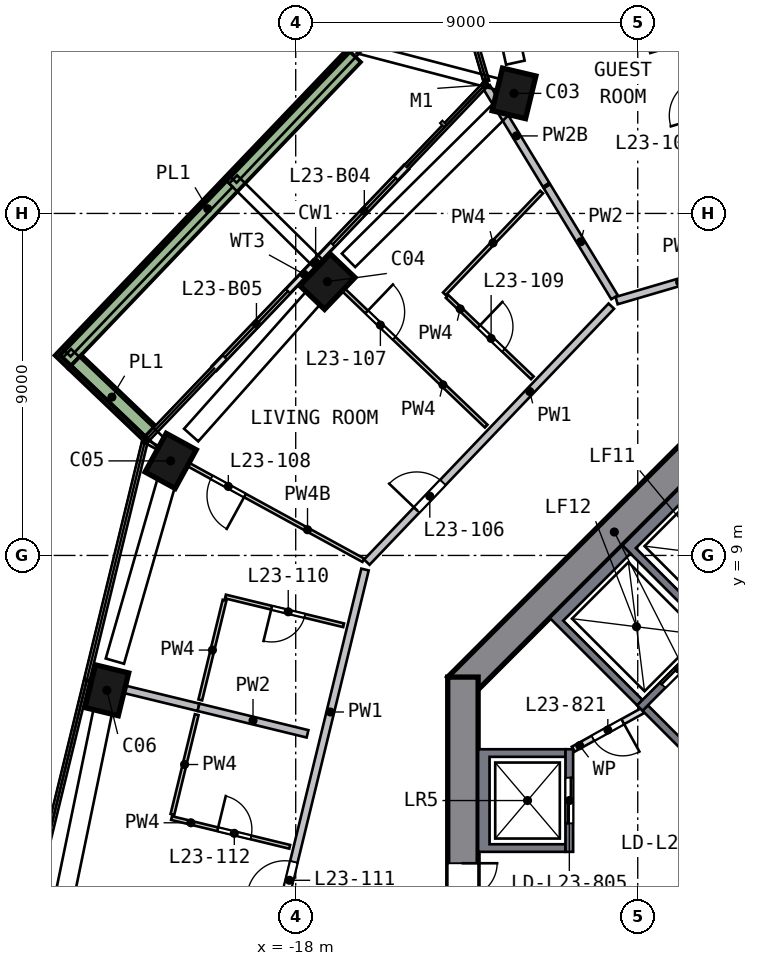
"""IFC4 building model, lengths in metres.
Left out: names, types, materials, properties, quantities, classifications, styles, units other than length and angle.
Written with IfcOpenShell. Run it as: python <this file> out.ifc"""

import sys

from ifc_helpers import new_model, si_unit, direction, frame, frame_2d, origin, origin_2d, place, context, subcontext, project, spatial, polyline, rectangle, outline, extrude, element, fill, save


model = new_model("IFC4")
c1 = context("Model", 3, precision=1e-05, world=origin(), true_north=direction((0.0, 1.0)))
c2 = subcontext(c1, "Body", "Model", "MODEL_VIEW")
j1 = project(units=[si_unit("LENGTHUNIT", "METRE"), si_unit("PLANEANGLEUNIT", "RADIAN")], contexts=[c1])
p1 = place(None, origin())
s1 = spatial("IfcSite", under=j1, at=p1, CompositionType="ELEMENT")
p2 = place(p1, origin())
s2 = spatial("IfcBuilding", under=s1, at=p2, CompositionType="ELEMENT")
p3 = place(p2, frame((0.0, 0.0, 100.0)))
s3 = spatial("IfcBuildingStorey", under=s2, at=p3, CompositionType="ELEMENT", Elevation=100.0)
p4 = place(p3, frame((-12.135, 21.23, 0.0), z_axis=(-0.100492101, -0.058531708, 0.993214668), x_axis=(0.229352652, 0.970019569, 0.080370372)))
e1 = element("IfcColumn", 1, at=p4, inside=s3, PredefinedType="COLUMN", context=c2, shape_type="SweptSolid", body=[
    extrude(rectangle(XDim=1.15, YDim=0.9, at=origin_2d()), origin(), (0.0, 0.0, 1.0), 3.212),
])
p5 = place(p3, frame((-17.074, 16.305, 0.0), z_axis=(-0.076886597, -0.0819059, 0.993669902), x_axis=(-0.686204712, -0.718682033, -0.112335337)))
e2 = element("IfcColumn", 2, at=p5, inside=s3, PredefinedType="COLUMN", context=c2, shape_type="SweptSolid", body=[
    extrude(rectangle(XDim=1.15, YDim=0.9, at=origin_2d()), origin(), (0.0, 0.0, 1.0), 3.21),
])
p6 = place(p3, frame((-21.225, 11.611, 0.0), z_axis=(-0.054358694, -0.101418877, 0.993357611), x_axis=(0.47668315, 0.871512169, 0.115063959)))
e3 = element("IfcColumn", 3, at=p6, inside=s3, PredefinedType="COLUMN", context=c2, shape_type="SweptSolid", body=[
    extrude(rectangle(XDim=1.15, YDim=0.9, at=origin_2d()), origin(), (0.0, 0.0, 1.0), 3.211),
])
p7 = place(p3, frame((-22.939, 5.583, 0.0), z_axis=(-0.025629126, -0.109285026, 0.993679994), x_axis=(-0.235079586, -0.965473156, -0.112246039)))
e4 = element("IfcColumn", 4, at=p7, inside=s3, PredefinedType="COLUMN", context=c2, shape_type="SweptSolid", body=[
    extrude(rectangle(XDim=1.15, YDim=0.9, at=origin_2d()), origin(), (0.0, 0.0, 1.0), 3.21),
])
p8 = place(p3, frame((-8.208, 22.873, 0.0), z_axis=(-0.108407543, -0.039911613, 0.993305022), x_axis=(-0.281714768, 0.959466442, 0.007806109)))
e5 = element("IfcColumn", 5, at=p8, inside=s3, PredefinedType="COLUMN", context=c2, shape_type="SweptSolid", body=[
    extrude(rectangle(XDim=0.9, YDim=0.9, at=origin_2d()), origin(), (0.0, 0.0, 1.0), 3.211),
])
p9 = place(p3, frame((-5.516, 13.717, 0.0), z_axis=(0.0, 0.0, 1.0), x_axis=(-0.707106781, -0.707106781, 0.0)))
e6 = element("IfcWall", 6, at=p9, inside=s3, PredefinedType="SHEAR", context=c2, shape_type="SweptSolid", body=[
    extrude(rectangle(XDim=11.598, YDim=0.8, at=frame_2d((5.799, 0.0))), origin(), (0.0, 0.0, 1.0), 3.5),
])
p10 = place(p3, frame((-13.6, 5.799, 0.0), z_axis=(0.0, 0.0, 1.0), x_axis=(0.0, -1.0, 0.0)))
e7 = element("IfcWall", 7, at=p10, inside=s3, PredefinedType="SHEAR", context=c2, shape_type="SweptSolid", body=[
    extrude(rectangle(XDim=11.598, YDim=0.8, at=frame_2d((5.799, 0.0))), origin(), (0.0, 0.0, 1.0), 3.5),
])
p11 = place(p10, frame((4.899, 0.0, 0.0)))
e8 = element("IfcOpeningElement", 8, at=p11, cuts=e7, PredefinedType="OPENING", context=c2, shape_type="SweptSolid", body=[
    extrude(rectangle(XDim=1.8, YDim=2.1, at=frame_2d((0.9, 1.05))), frame((0.0, 0.41, 0.0), z_axis=(0.0, -1.0, 0.0), x_axis=(1.0, 0.0, 0.0)), (0.0, 0.0, 1.0), 0.82),
])
p12 = place(p3, frame((-15.09, 19.215, 0.0), z_axis=(0.0, 0.0, 1.0), x_axis=(-0.690619436, -0.723218359, 0.0)))
e9 = element("IfcWall", 9, at=p12, inside=s3, PredefinedType="SOLIDWALL", context=c2, shape_type="SweptSolid", body=[
    extrude(rectangle(XDim=3.475, YDim=0.15, at=frame_2d((1.738, 0.0))), origin(), (0.0, 0.0, 1.0), 2.425),
])
p13 = place(p12, frame((0.4, 0.0, 0.0)))
e10 = element("IfcOpeningElement", 10, at=p13, cuts=e9, PredefinedType="OPENING", context=c2, shape_type="SweptSolid", body=[
    extrude(rectangle(XDim=2.4, YDim=2.4, at=frame_2d((1.2, 1.2))), frame((0.0, 0.085, 0.0), z_axis=(0.0, -1.0, 0.0), x_axis=(1.0, 0.0, 0.0)), (0.0, 0.0, 1.0), 0.17),
])
p14 = place(p3, frame((-17.49, 16.702, 0.0), z_axis=(0.0, 0.0, 1.0), x_axis=(-0.690655886, -0.72318355, 0.0)))
e11 = element("IfcWall", 11, at=p14, inside=s3, PredefinedType="SOLIDWALL", context=c2, shape_type="SweptSolid", body=[
    extrude(rectangle(XDim=3.835, YDim=0.15, at=frame_2d((1.918, 0.0))), origin(), (0.0, 0.0, 1.0), 2.425),
])
p15 = place(p14, frame((1.035, 0.0, 0.0)))
e12 = element("IfcOpeningElement", 12, at=p15, cuts=e11, PredefinedType="OPENING", context=c2, shape_type="SweptSolid", body=[
    extrude(rectangle(XDim=2.4, YDim=2.4, at=frame_2d((1.2, 1.2))), frame((0.0, 0.085, 0.0), z_axis=(0.0, -1.0, 0.0), x_axis=(1.0, 0.0, 0.0)), (0.0, 0.0, 1.0), 0.17),
])
p16 = place(p3, frame((-16.464, 22.156, 0.0), z_axis=(0.0, 0.0, 1.0), x_axis=(-0.690643379, -0.723195495, 0.0)))
e13 = element("IfcWall", 13, at=p16, inside=s3, PredefinedType="SOLIDWALL", context=c2, shape_type="SweptSolid", body=[
    extrude(rectangle(XDim=11.153, YDim=0.5, at=frame_2d((5.576, 0.0))), origin(), (0.0, 0.0, 1.0), 0.7),
])
p17 = place(p3, frame((-23.813, 14.098, 0.0), z_axis=(0.0, 0.0, 1.0), x_axis=(0.723201505, -0.690637085, 0.0)))
e14 = element("IfcWall", 14, at=p17, inside=s3, PredefinedType="SOLIDWALL", context=c2, shape_type="SweptSolid", body=[
    extrude(rectangle(XDim=2.699, YDim=0.5, at=frame_2d((1.35, 0.0))), origin(), (0.0, 0.0, 1.0), 0.7),
])
p18 = place(p3, origin())
e15 = element("IfcWall", 15, at=p18, inside=s3, PredefinedType="SOLIDWALL", context=c2, shape_type="SweptSolid", body=[
    extrude(outline(polyline([(-13.2, 3.9), (-10.9, 3.9), (-10.9, 3.7), (-12.9, 3.7), (-12.9, 1.4), (-10.9, 1.4), (-10.9, 1.2), (-13.2, 1.2), (-13.2, 3.9)])), origin(), (0.0, 0.0, 1.0), 3.19),
])
p19 = place(p3, frame((-10.8, 1.2, 0.0), z_axis=(0.0, 0.0, 1.0), x_axis=(0.0, 1.0, 0.0)))
e16 = element("IfcWall", 16, at=p19, inside=s3, PredefinedType="SOLIDWALL", context=c2, shape_type="SweptSolid", body=[
    extrude(rectangle(XDim=2.7, YDim=0.2, at=frame_2d((1.35, 0.0))), origin(), (0.0, 0.0, 1.0), 3.19),
])
p20 = place(p19, frame((0.75, 0.0, 0.0)))
e17 = element("IfcOpeningElement", 17, at=p20, cuts=e16, PredefinedType="OPENING", context=c2, shape_type="SweptSolid", body=[
    extrude(rectangle(XDim=1.2, YDim=2.1, at=frame_2d((0.6, 1.05))), frame((0.0, 0.11, 0.0), z_axis=(0.0, -1.0, 0.0), x_axis=(1.0, 0.0, 0.0)), (0.0, 0.0, 1.0), 0.22),
])
p21 = place(p3, origin())
e18 = element("IfcWall", 18, at=p21, inside=s3, PredefinedType="SOLIDWALL", context=c2, shape_type="SweptSolid", body=[
    extrude(outline(polyline([(-9.405, 9.263), (-7.354, 11.314), (-5.056, 9.016), (-5.197, 8.874), (-7.283, 10.96), (-9.051, 9.192), (-6.965, 7.106), (-7.106, 6.965), (-9.405, 9.263)])), origin(), (0.0, 0.0, 1.0), 3.19),
])
p22 = place(p3, origin())
e19 = element("IfcWall", 19, at=p22, inside=s3, PredefinedType="SOLIDWALL", context=c2, shape_type="SweptSolid", body=[
    extrude(outline(polyline([(-11.314, 7.354), (-9.405, 9.263), (-9.192, 9.051), (-10.96, 7.283), (-8.874, 5.197), (-9.016, 5.056), (-11.314, 7.354)])), origin(), (0.0, 0.0, 1.0), 3.19),
])
p23 = place(p3, frame((-7.036, 6.894, 0.0), z_axis=(0.0, 0.0, 1.0), x_axis=(-0.707106781, -0.707106781, 0.0)))
e20 = element("IfcWall", 20, at=p23, inside=s3, PredefinedType="SOLIDWALL", context=c2, shape_type="SweptSolid", body=[
    extrude(rectangle(XDim=2.7, YDim=0.2, at=frame_2d((1.35, 0.0))), origin(), (0.0, 0.0, 1.0), 3.19),
])
p24 = place(p23, frame((0.65, 0.0, 0.0)))
e21 = element("IfcOpeningElement", 21, at=p24, cuts=e20, PredefinedType="OPENING", context=c2, shape_type="SweptSolid", body=[
    extrude(rectangle(XDim=1.2, YDim=2.1, at=frame_2d((0.6, 1.05))), frame((0.0, 0.11, 0.0), z_axis=(0.0, -1.0, 0.0), x_axis=(1.0, 0.0, 0.0)), (0.0, 0.0, 1.0), 0.22),
])
p25 = place(p3, frame((-6.823, 3.005, 0.0), z_axis=(0.0, 0.0, 1.0), x_axis=(-0.707106781, 0.707106781, 0.0)))
e22 = element("IfcWall", 22, at=p25, inside=s3, PredefinedType="SOLIDWALL", context=c2, shape_type="SweptSolid", body=[
    extrude(rectangle(XDim=2.8, YDim=0.2, at=frame_2d((1.4, 0.0))), origin(), (0.0, 0.0, 1.0), 3.19),
])
p26 = place(p3, frame((-8.874, 4.914, 0.0), z_axis=(0.0, 0.0, 1.0), x_axis=(-0.874129705, -0.485692555, 0.0)))
e23 = element("IfcWall", 23, at=p26, inside=s3, PredefinedType="PARTITIONING", context=c2, shape_type="SweptSolid", body=[
    extrude(rectangle(XDim=2.089, YDim=0.15, at=frame_2d((1.044, 0.0))), origin(), (0.0, 0.0, 1.0), 3.19),
])
p27 = place(p26, frame((0.594, 0.0, 0.0)))
e24 = element("IfcOpeningElement", 24, at=p27, cuts=e23, PredefinedType="OPENING", context=c2, shape_type="SweptSolid", body=[
    extrude(rectangle(XDim=0.9, YDim=2.1, at=frame_2d((0.45, 1.05))), frame((0.0, 0.085, 0.0), z_axis=(0.0, -1.0, 0.0), x_axis=(1.0, 0.0, 0.0)), (0.0, 0.0, 1.0), 0.17),
])
p28 = place(p3, frame((-18.333, -0.229, 0.0), z_axis=(0.0, 0.0, 1.0), x_axis=(0.236500551, 0.971631355, 0.0)))
e25 = element("IfcWall", 25, at=p28, inside=s3, PredefinedType="SOLIDWALL", context=c2, shape_type="SweptSolid", body=[
    extrude(rectangle(XDim=9.116, YDim=0.2, at=frame_2d((4.558, 0.0))), origin(), (0.0, 0.0, 1.0), 3.19),
])
p29 = place(p28, frame((0.2, 0.0, 0.0)))
e26 = element("IfcOpeningElement", 26, at=p29, cuts=e25, PredefinedType="OPENING", context=c2, shape_type="SweptSolid", body=[
    extrude(rectangle(XDim=1.0, YDim=2.1, at=frame_2d((0.5, 1.05))), frame((0.0, 0.11, 0.0), z_axis=(0.0, -1.0, 0.0), x_axis=(1.0, 0.0, 0.0)), (0.0, 0.0, 1.0), 0.22),
])
p30 = place(p3, frame((-16.129, 8.823, 0.0), z_axis=(0.0, 0.0, 1.0), x_axis=(0.69063279, 0.723205606, 0.0)))
e27 = element("IfcWall", 27, at=p30, inside=s3, PredefinedType="SOLIDWALL", context=c2, shape_type="SweptSolid", body=[
    extrude(rectangle(XDim=9.317, YDim=0.2, at=frame_2d((4.658, 0.0))), origin(), (0.0, 0.0, 1.0), 3.19),
])
p31 = place(p30, frame((1.9, 0.0, 0.0)))
e28 = element("IfcOpeningElement", 28, at=p31, cuts=e27, PredefinedType="OPENING", context=c2, shape_type="SweptSolid", body=[
    extrude(rectangle(XDim=1.0, YDim=2.1, at=frame_2d((0.5, 1.05))), frame((0.0, 0.11, 0.0), z_axis=(0.0, -1.0, 0.0), x_axis=(1.0, 0.0, 0.0)), (0.0, 0.0, 1.0), 0.22),
])
p32 = place(p3, frame((-6.238, 16.677, 0.0), z_axis=(0.0, 0.0, 1.0), x_axis=(-0.959713265, -0.280981227, 0.0)))
e29 = element("IfcWall", 29, at=p32, inside=s3, PredefinedType="SOLIDWALL", context=c2, shape_type="SweptSolid", body=[
    extrude(rectangle(XDim=3.458, YDim=0.2, at=frame_2d((1.729, 0.0))), origin(), (0.0, 0.0, 1.0), 3.19),
])
p33 = place(p3, frame((-6.046, 16.734, 0.0), z_axis=(0.0, 0.0, 1.0), x_axis=(-0.280980732, 0.959713409, 0.0)))
e30 = element("IfcWall", 30, at=p33, inside=s3, PredefinedType="SOLIDWALL", context=c2, shape_type="SweptSolid", body=[
    extrude(rectangle(XDim=11.708, YDim=0.2, at=frame_2d((5.854, 0.0))), origin(), (0.0, 0.0, 1.0), 3.19),
])
p34 = place(p33, frame((4.0, 0.0, 0.0)))
e31 = element("IfcOpeningElement", 31, at=p34, cuts=e30, PredefinedType="OPENING", context=c2, shape_type="SweptSolid", body=[
    extrude(rectangle(XDim=1.0, YDim=2.1, at=frame_2d((0.5, 1.05))), frame((0.0, 0.11, 0.0), z_axis=(0.0, -1.0, 0.0), x_axis=(1.0, 0.0, 0.0)), (0.0, 0.0, 1.0), 0.22),
])
p35 = place(p3, frame((-20.558, 5.004, 0.0), z_axis=(0.0, 0.0, 1.0), x_axis=(-0.971623409, 0.236533194, 0.0)))
e32 = element("IfcWall", 32, at=p35, inside=s3, PredefinedType="SOLIDWALL", context=c2, shape_type="SweptSolid", body=[
    extrude(rectangle(XDim=2.95, YDim=0.2, at=frame_2d((1.475, 0.0))), origin(), (0.0, 0.0, 1.0), 3.19),
])
p36 = place(p3, frame((-17.689, 4.306, 0.0), z_axis=(0.0, 0.0, 1.0), x_axis=(-0.971636288, 0.236480281, 0.0)))
e33 = element("IfcWall", 33, at=p36, inside=s3, PredefinedType="SOLIDWALL", context=c2, shape_type="SweptSolid", body=[
    extrude(rectangle(XDim=2.953, YDim=0.2, at=frame_2d((1.476, 0.0))), origin(), (0.0, 0.0, 1.0), 3.19),
])
p37 = place(p3, frame((-11.411, 18.754, 0.0), z_axis=(0.0, 0.0, 1.0), x_axis=(-0.51983892, 0.854264302, 0.0)))
e34 = element("IfcWall", 34, at=p37, inside=s3, PredefinedType="SOLIDWALL", context=c2, shape_type="SweptSolid", body=[
    extrude(rectangle(XDim=3.011, YDim=0.2, at=frame_2d((1.506, 0.0))), origin(), (0.0, 0.0, 1.0), 2.69),
])
p38 = place(p3, frame((-9.611, 15.794, 0.0), z_axis=(0.0, 0.0, 1.0), x_axis=(-0.519810992, 0.854281296, 0.0)))
e35 = element("IfcWall", 35, at=p38, inside=s3, PredefinedType="SOLIDWALL", context=c2, shape_type="SweptSolid", body=[
    extrude(rectangle(XDim=3.418, YDim=0.2, at=frame_2d((1.709, 0.0))), origin(), (0.0, 0.0, 1.0), 3.19),
])
p39 = place(p3, frame((-21.244, 2.186, 0.0), z_axis=(0.0, 0.0, 1.0), x_axis=(0.23646695, 0.971639533, 0.0)))
e36 = element("IfcWall", 36, at=p39, inside=s3, PredefinedType="PARTITIONING", context=c2, shape_type="SweptSolid", body=[
    extrude(rectangle(XDim=2.7, YDim=0.1, at=frame_2d((1.35, 0.0))), origin(), (0.0, 0.0, 1.0), 3.19),
])
p40 = place(p3, frame((-19.872, 7.822, 0.0), z_axis=(0.0, 0.0, 1.0), x_axis=(-0.236446175, -0.971644588, 0.0)))
e37 = element("IfcWall", 37, at=p40, inside=s3, PredefinedType="PARTITIONING", context=c2, shape_type="SweptSolid", body=[
    extrude(rectangle(XDim=2.7, YDim=0.1, at=frame_2d((1.35, 0.0))), origin(), (0.0, 0.0, 1.0), 3.19),
])
p41 = place(p3, frame((-21.268, 2.089, 0.0), z_axis=(0.0, 0.0, 1.0), x_axis=(0.971627336, -0.236517059, 0.0)))
e38 = element("IfcWall", 38, at=p41, inside=s3, PredefinedType="PARTITIONING", context=c2, shape_type="SweptSolid", body=[
    extrude(rectangle(XDim=3.2, YDim=0.1, at=frame_2d((1.6, 0.0))), origin(), (0.0, 0.0, 1.0), 3.19),
])
p42 = place(p41, frame((1.25, 0.0, 0.0)))
e39 = element("IfcOpeningElement", 39, at=p42, cuts=e38, PredefinedType="OPENING", context=c2, shape_type="SweptSolid", body=[
    extrude(rectangle(XDim=0.9, YDim=2.1, at=frame_2d((0.45, 1.05))), frame((0.0, 0.06, 0.0), z_axis=(0.0, -1.0, 0.0), x_axis=(1.0, 0.0, 0.0)), (0.0, 0.0, 1.0), 0.12),
])
p43 = place(p3, frame((-16.22, 8.873, 0.0), z_axis=(0.0, 0.0, 1.0), x_axis=(-0.877312858, 0.479918898, 0.0)))
e40 = element("IfcWall", 40, at=p43, inside=s3, PredefinedType="PARTITIONING", context=c2, shape_type="SweptSolid", body=[
    extrude(rectangle(XDim=6.476, YDim=0.1, at=frame_2d((3.238, 0.0))), origin(), (0.0, 0.0, 1.0), 2.69),
])
p44 = place(p43, frame((3.55, 0.0, 0.0)))
e41 = element("IfcOpeningElement", 41, at=p44, cuts=e40, PredefinedType="OPENING", context=c2, shape_type="SweptSolid", body=[
    extrude(rectangle(XDim=1.0, YDim=2.1, at=frame_2d((0.5, 1.05))), frame((0.0, 0.06, 0.0), z_axis=(0.0, -1.0, 0.0), x_axis=(1.0, 0.0, 0.0)), (0.0, 0.0, 1.0), 0.12),
])
p45 = place(p3, frame((-16.74, 7.162, 0.0), z_axis=(0.0, 0.0, 1.0), x_axis=(-0.971644867, 0.236445029, 0.0)))
e42 = element("IfcWall", 42, at=p45, inside=s3, PredefinedType="PARTITIONING", context=c2, shape_type="SweptSolid", body=[
    extrude(rectangle(XDim=3.2, YDim=0.1, at=frame_2d((1.6, 0.0))), origin(), (0.0, 0.0, 1.0), 3.19),
])
p46 = place(p45, frame((1.05, 0.0, 0.0)))
e43 = element("IfcOpeningElement", 43, at=p46, cuts=e42, PredefinedType="OPENING", context=c2, shape_type="SweptSolid", body=[
    extrude(rectangle(XDim=0.9, YDim=2.1, at=frame_2d((0.45, 1.05))), frame((0.0, 0.06, 0.0), z_axis=(0.0, -1.0, 0.0), x_axis=(1.0, 0.0, 0.0)), (0.0, 0.0, 1.0), 0.12),
])
p47 = place(p3, frame((-17.435, 16.65, 0.0), z_axis=(0.0, 0.0, 1.0), x_axis=(0.723214934, -0.690623022, 0.0)))
e44 = element("IfcWall", 44, at=p47, inside=s3, PredefinedType="PARTITIONING", context=c2, shape_type="SweptSolid", body=[
    extrude(rectangle(XDim=6.15, YDim=0.1, at=frame_2d((3.075, 0.0))), origin(), (0.0, 0.0, 1.0), 3.19),
])
p48 = place(p47, frame((1.8, 0.0, 0.0)))
e45 = element("IfcOpeningElement", 45, at=p48, cuts=e44, PredefinedType="OPENING", context=c2, shape_type="SweptSolid", body=[
    extrude(rectangle(XDim=1.0, YDim=2.1, at=frame_2d((0.5, 1.05))), frame((0.0, 0.06, 0.0), z_axis=(0.0, -1.0, 0.0), x_axis=(1.0, 0.0, 0.0)), (0.0, 0.0, 1.0), 0.12),
])
p49 = place(p3, frame((-14.015, 15.815, 0.0), z_axis=(0.0, 0.0, 1.0), x_axis=(0.723221432, -0.690616218, 0.0)))
e46 = element("IfcWall", 46, at=p49, inside=s3, PredefinedType="PARTITIONING", context=c2, shape_type="SweptSolid", body=[
    extrude(rectangle(XDim=3.1, YDim=0.1, at=frame_2d((1.55, 0.0))), origin(), (0.0, 0.0, 1.0), 3.19),
])
p50 = place(p49, frame((1.15, 0.0, 0.0)))
e47 = element("IfcOpeningElement", 47, at=p50, cuts=e46, PredefinedType="OPENING", context=c2, shape_type="SweptSolid", body=[
    extrude(rectangle(XDim=0.9, YDim=2.1, at=frame_2d((0.45, 1.05))), frame((0.0, 0.06, 0.0), z_axis=(0.0, -1.0, 0.0), x_axis=(1.0, 0.0, 0.0)), (0.0, 0.0, 1.0), 0.12),
])
p51 = place(p3, frame((-11.529, 18.563, 0.0), z_axis=(0.0, 0.0, 1.0), x_axis=(-0.690638766, -0.723199899, 0.0)))
e48 = element("IfcWall", 48, at=p51, inside=s3, PredefinedType="PARTITIONING", context=c2, shape_type="SweptSolid", body=[
    extrude(rectangle(XDim=3.704, YDim=0.1, at=frame_2d((1.852, 0.0))), origin(), (0.0, 0.0, 1.0), 3.19),
])
p52 = place(p13, origin())
e49 = element("IfcDoor", 49, at=p52, inside=s3, OperationType="SLIDING_TO_RIGHT", PredefinedType="DOOR", context=c2, shape_type="SweptSolid", body=[
    extrude(rectangle(XDim=2.4, YDim=2.4, at=frame_2d((1.2, 1.2))), frame((0.0, 0.025, 0.0), z_axis=(0.0, -1.0, 0.0), x_axis=(1.0, 0.0, 0.0)), (0.0, 0.0, 1.0), 0.05),
])
fill(e10, e49)
p53 = place(p15, origin())
e50 = element("IfcDoor", 50, at=p53, inside=s3, OperationType="SLIDING_TO_LEFT", PredefinedType="DOOR", context=c2, shape_type="SweptSolid", body=[
    extrude(rectangle(XDim=2.4, YDim=2.4, at=frame_2d((1.2, 1.2))), frame((0.0, 0.025, 0.0), z_axis=(0.0, -1.0, 0.0), x_axis=(1.0, 0.0, 0.0)), (0.0, 0.0, 1.0), 0.05),
])
fill(e12, e50)
p54 = place(p20, origin())
e51 = element("IfcDoor", 51, at=p54, inside=s3, OperationType="DOUBLE_DOOR_SLIDING", PredefinedType="DOOR", context=c2, shape_type="SweptSolid", body=[
    extrude(rectangle(XDim=1.2, YDim=2.1, at=frame_2d((0.6, 1.05))), frame((0.0, 0.025, 0.0), z_axis=(0.0, -1.0, 0.0), x_axis=(1.0, 0.0, 0.0)), (0.0, 0.0, 1.0), 0.05),
])
fill(e17, e51)
p55 = place(p24, origin())
e52 = element("IfcDoor", 52, at=p55, inside=s3, OperationType="DOUBLE_DOOR_SLIDING", PredefinedType="DOOR", context=c2, shape_type="SweptSolid", body=[
    extrude(rectangle(XDim=1.2, YDim=2.1, at=frame_2d((0.6, 1.05))), frame((0.0, 0.025, 0.0), z_axis=(0.0, -1.0, 0.0), x_axis=(1.0, 0.0, 0.0)), (0.0, 0.0, 1.0), 0.05),
])
fill(e21, e52)
p56 = place(p11, origin())
e53 = element("IfcDoor", 53, at=p56, inside=s3, OperationType="DOUBLE_DOOR_SINGLE_SWING", PredefinedType="DOOR", context=c2, shape_type="SweptSolid", body=[
    extrude(rectangle(XDim=1.8, YDim=2.1, at=frame_2d((0.9, 1.05))), frame((0.0, 0.025, 0.0), z_axis=(0.0, -1.0, 0.0), x_axis=(1.0, 0.0, 0.0)), (0.0, 0.0, 1.0), 0.05),
])
fill(e8, e53)
p57 = place(p27, origin())
e54 = element("IfcDoor", 54, at=p57, inside=s3, OperationType="SINGLE_SWING_LEFT", PredefinedType="DOOR", context=c2, shape_type="SweptSolid", body=[
    extrude(rectangle(XDim=0.9, YDim=2.1, at=frame_2d((0.45, 1.05))), frame((0.0, 0.025, 0.0), z_axis=(0.0, -1.0, 0.0), x_axis=(1.0, 0.0, 0.0)), (0.0, 0.0, 1.0), 0.05),
])
fill(e24, e54)
p58 = place(p31, origin())
e55 = element("IfcDoor", 55, at=p58, inside=s3, OperationType="SINGLE_SWING_LEFT", PredefinedType="DOOR", context=c2, shape_type="SweptSolid", body=[
    extrude(rectangle(XDim=1.0, YDim=2.1, at=frame_2d((0.5, 1.05))), frame((0.0, 0.025, 0.0), z_axis=(0.0, -1.0, 0.0), x_axis=(1.0, 0.0, 0.0)), (0.0, 0.0, 1.0), 0.05),
])
fill(e28, e55)
p59 = place(p48, origin())
e56 = element("IfcDoor", 56, at=p59, inside=s3, OperationType="SINGLE_SWING_LEFT", PredefinedType="DOOR", context=c2, shape_type="SweptSolid", body=[
    extrude(rectangle(XDim=1.0, YDim=2.1, at=frame_2d((0.5, 1.05))), frame((0.0, 0.025, 0.0), z_axis=(0.0, -1.0, 0.0), x_axis=(1.0, 0.0, 0.0)), (0.0, 0.0, 1.0), 0.05),
])
fill(e45, e56)
p60 = place(p44, origin())
e57 = element("IfcDoor", 57, at=p60, inside=s3, OperationType="SINGLE_SWING_LEFT", PredefinedType="DOOR", context=c2, shape_type="SweptSolid", body=[
    extrude(rectangle(XDim=1.0, YDim=2.1, at=frame_2d((0.5, 1.05))), frame((0.0, 0.025, 0.0), z_axis=(0.0, -1.0, 0.0), x_axis=(1.0, 0.0, 0.0)), (0.0, 0.0, 1.0), 0.05),
])
fill(e41, e57)
p61 = place(p50, origin())
e58 = element("IfcDoor", 58, at=p61, inside=s3, OperationType="SINGLE_SWING_LEFT", PredefinedType="DOOR", context=c2, shape_type="SweptSolid", body=[
    extrude(rectangle(XDim=0.9, YDim=2.1, at=frame_2d((0.45, 1.05))), frame((0.0, 0.025, 0.0), z_axis=(0.0, -1.0, 0.0), x_axis=(1.0, 0.0, 0.0)), (0.0, 0.0, 1.0), 0.05),
])
fill(e47, e58)
p62 = place(p46, origin())
e59 = element("IfcDoor", 59, at=p62, inside=s3, OperationType="SINGLE_SWING_RIGHT", PredefinedType="DOOR", context=c2, shape_type="SweptSolid", body=[
    extrude(rectangle(XDim=0.9, YDim=2.1, at=frame_2d((0.45, 1.05))), frame((0.0, 0.025, 0.0), z_axis=(0.0, -1.0, 0.0), x_axis=(1.0, 0.0, 0.0)), (0.0, 0.0, 1.0), 0.05),
])
fill(e43, e59)
p63 = place(p29, origin())
e60 = element("IfcDoor", 60, at=p63, inside=s3, OperationType="SINGLE_SWING_LEFT", PredefinedType="DOOR", context=c2, shape_type="SweptSolid", body=[
    extrude(rectangle(XDim=1.0, YDim=2.1, at=frame_2d((0.5, 1.05))), frame((0.0, 0.025, 0.0), z_axis=(0.0, -1.0, 0.0), x_axis=(1.0, 0.0, 0.0)), (0.0, 0.0, 1.0), 0.05),
])
fill(e26, e60)
p64 = place(p42, origin())
e61 = element("IfcDoor", 61, at=p64, inside=s3, OperationType="SINGLE_SWING_LEFT", PredefinedType="DOOR", context=c2, shape_type="SweptSolid", body=[
    extrude(rectangle(XDim=0.9, YDim=2.1, at=frame_2d((0.45, 1.05))), frame((0.0, 0.025, 0.0), z_axis=(0.0, -1.0, 0.0), x_axis=(1.0, 0.0, 0.0)), (0.0, 0.0, 1.0), 0.05),
])
fill(e39, e61)
save(model, sys.argv[1])
